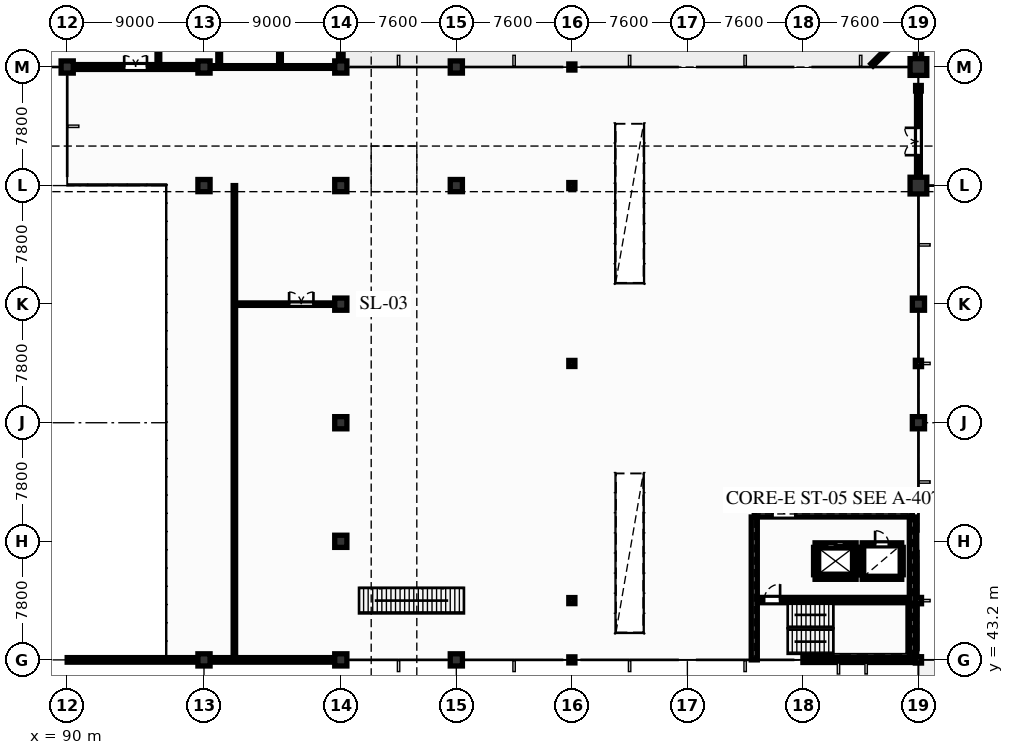
"""IFC4 building model, lengths in metres.
Left out: names, types, materials, properties, quantities, classifications, styles, units other than length and angle.
Written with IfcOpenShell. Run it as: python <this file> out.ifc"""

import sys

from ifc_helpers import new_model, si_unit, direction, frame, frame_2d, origin, origin_2d, place, context, subcontext, project, spatial, polyline, rectangle, i_section, outline, extrude, element, fill, save


model = new_model("IFC4")
c1 = context("Model", 3, precision=1e-05, world=origin(), true_north=direction((0.0, 1.0)))
c2 = subcontext(c1, "Body", "Model", "MODEL_VIEW")
j1 = project(units=[si_unit("LENGTHUNIT", "METRE"), si_unit("PLANEANGLEUNIT", "RADIAN")], contexts=[c1])
p1 = place(None, origin())
s1 = spatial("IfcSite", under=j1, at=p1, CompositionType="ELEMENT")
p2 = place(p1, origin())
s2 = spatial("IfcBuilding", under=s1, at=p2, CompositionType="ELEMENT")
p3 = place(p2, frame((0.0, 0.0, 5.1)))
s3 = spatial("IfcBuildingStorey", under=s2, at=p3, CompositionType="ELEMENT", Elevation=5.1)
for number, where, z_axis, x_axis in (
    (1, (90.0, 82.2, 0.0), (0.0, 0.0, 1.0), (1.0, 0.0, 0.0)),
    (2, (99.0, 43.2, 0.0), (0.0, 0.0, 1.0), (1.0, 0.0, 0.0)),
    (3, (99.0, 74.4, 0.0), (0.0, 0.0, 1.0), (1.0, 0.0, 0.0)),
    (4, (99.0, 82.2, 0.0), (0.0, 0.0, 1.0), (1.0, 0.0, 0.0)),
    (5, (108.0, 43.2, 0.0), (0.0, 0.0, 1.0), (1.0, 0.0, 0.0)),
    (6, (108.0, 51.0, 0.0), (0.0, 0.0, 1.0), (1.0, 0.0, 0.0)),
    (7, (108.0, 58.8, 0.0), (0.0, 0.0, 1.0), (1.0, 0.0, 0.0)),
    (8, (108.0, 66.6, 0.0), (0.0, 0.0, 1.0), (1.0, 0.0, 0.0)),
    (9, (108.0, 74.4, 0.0), (0.0, 0.0, 1.0), (1.0, 0.0, 0.0)),
    (10, (108.0, 82.2, 0.0), (0.0, 0.0, 1.0), (1.0, 0.0, 0.0)),
    (11, (115.6, 43.2, 0.0), (0.0, 0.0, 1.0), (1.0, 0.0, 0.0)),
    (12, (115.6, 74.4, 0.0), (0.0, 0.0, 1.0), (1.0, 0.0, 0.0)),
    (13, (115.6, 82.2, 0.0), (0.0, 0.0, 1.0), (1.0, 0.0, 0.0)),
):
    element("IfcColumn", number, at=place(p3, frame(where, z_axis=z_axis, x_axis=x_axis)), inside=s3, PredefinedType="COLUMN", context=c2, shape_type="SweptSolid", body=[
        extrude(rectangle(XDim=0.8, YDim=0.8, at=origin_2d()), origin(), (0.0, 0.0, 1.0), 3.84),
    ])
for number, where, z_axis, x_axis in (
    (14, (123.2, 43.2, 0.0), (0.0, 0.0, 1.0), (1.0, 0.0, 0.0)),
    (15, (123.2, 74.4, 0.0), (0.0, 0.0, 1.0), (1.0, 0.0, 0.0)),
    (16, (123.2, 82.2, 0.0), (0.0, 0.0, 1.0), (1.0, 0.0, 0.0)),
):
    element("IfcColumn", number, at=place(p3, frame(where, z_axis=z_axis, x_axis=x_axis)), inside=s3, PredefinedType="COLUMN", context=c2, shape_type="SweptSolid", body=[
        extrude(i_section(OverallWidth=0.401, OverallDepth=0.399, WebThickness=0.025, FlangeThickness=0.04, at=origin_2d()), origin(), (0.0, 0.0, 1.0), 3.84),
    ])
for number, where, z_axis, x_axis in (
    (17, (146.0, 58.8, 0.0), (0.0, 0.0, 1.0), (1.0, 0.0, 0.0)),
    (18, (146.0, 66.6, 0.0), (0.0, 0.0, 1.0), (1.0, 0.0, 0.0)),
):
    element("IfcColumn", number, at=place(p3, frame(where, z_axis=z_axis, x_axis=x_axis)), inside=s3, PredefinedType="COLUMN", context=c2, shape_type="SweptSolid", body=[
        extrude(rectangle(XDim=0.8, YDim=0.8, at=origin_2d()), origin(), (0.0, 0.0, 1.0), 3.84),
    ])
for number, where, z_axis, x_axis in (
    (19, (146.0, 74.4, 0.0), (0.0, 0.0, 1.0), (1.0, 0.0, 0.0)),
    (20, (146.0, 82.2, 0.0), (0.0, 0.0, 1.0), (1.0, 0.0, 0.0)),
):
    element("IfcColumn", number, at=place(p3, frame(where, z_axis=z_axis, x_axis=x_axis)), inside=s3, PredefinedType="COLUMN", context=c2, shape_type="SweptSolid", body=[
        extrude(rectangle(XDim=1.1, YDim=1.1, at=origin_2d()), origin(), (0.0, 0.0, 1.0), 3.84),
    ])
p4 = place(p3, frame((123.2, 47.1, 0.0), z_axis=(0.0, 0.0, 1.0), x_axis=(1.0, 0.0, 0.0)))
e21 = element("IfcColumn", 21, at=p4, inside=s3, PredefinedType="COLUMN", context=c2, shape_type="SweptSolid", body=[
    extrude(i_section(OverallWidth=0.401, OverallDepth=0.399, WebThickness=0.025, FlangeThickness=0.04, at=origin_2d()), origin(), (0.0, 0.0, 1.0), 3.84),
])
p5 = place(p3, frame((146.0, 47.1, 0.0), z_axis=(0.0, 0.0, 1.0), x_axis=(1.0, 0.0, 0.0)))
e22 = element("IfcColumn", 22, at=p5, inside=s3, PredefinedType="COLUMN", context=c2, shape_type="SweptSolid", body=[
    extrude(i_section(OverallWidth=0.406, OverallDepth=0.417, WebThickness=0.03, FlangeThickness=0.048, at=origin_2d()), origin(), (0.0, 0.0, 1.0), 3.84),
])
p6 = place(p3, frame((123.2, 62.7, 0.0), z_axis=(0.0, 0.0, 1.0), x_axis=(1.0, 0.0, 0.0)))
e23 = element("IfcColumn", 23, at=p6, inside=s3, PredefinedType="COLUMN", context=c2, shape_type="SweptSolid", body=[
    extrude(i_section(OverallWidth=0.401, OverallDepth=0.399, WebThickness=0.025, FlangeThickness=0.04, at=origin_2d()), origin(), (0.0, 0.0, 1.0), 3.84),
])
for number, where, z_axis, x_axis in (
    (24, (146.0, 62.7, 0.0), (0.0, 0.0, 1.0), (1.0, 0.0, 0.0)),
    (25, (146.0, 43.2, 0.0), (0.0, 0.0, 1.0), (1.0, 0.0, 0.0)),
):
    element("IfcColumn", number, at=place(p3, frame(where, z_axis=z_axis, x_axis=x_axis)), inside=s3, PredefinedType="COLUMN", context=c2, shape_type="SweptSolid", body=[
        extrude(i_section(OverallWidth=0.406, OverallDepth=0.417, WebThickness=0.03, FlangeThickness=0.048, at=origin_2d()), origin(), (0.0, 0.0, 1.0), 3.84),
    ])
p7 = place(p3, frame((146.0, 80.8, 0.0), z_axis=(0.0, 0.0, 1.0), x_axis=(1.0, 0.0, 0.0)))
e26 = element("IfcColumn", 26, at=p7, inside=s3, PredefinedType="COLUMN", context=c2, shape_type="SweptSolid", body=[
    extrude(i_section(OverallWidth=0.373, OverallDepth=0.368, WebThickness=0.015, FlangeThickness=0.024, at=origin_2d()), origin(), (0.0, 0.0, 1.0), 3.84),
])
p8 = place(p3, frame((108.0, 82.2, 0.0), z_axis=(0.0, 0.0, 1.0), x_axis=(0.0, 1.0, 0.0)))
e27 = element("IfcWall", 27, at=p8, inside=s3, PredefinedType="SOLIDWALL", context=c2, shape_type="SweptSolid", body=[
    extrude(rectangle(XDim=31.8, YDim=0.3, at=frame_2d((15.9, 0.0))), origin(), (0.0, 0.0, 1.0), 2.815),
])
p9 = place(p8, frame((3.2, 0.0, 0.595)))
e28 = element("IfcOpeningElement", 28, at=p9, cuts=e27, PredefinedType="OPENING", context=c2, shape_type="SweptSolid", body=[
    extrude(rectangle(XDim=1.5, YDim=2.1, at=frame_2d((0.75, 1.05))), frame((0.0, 0.16, 0.0), z_axis=(0.0, -1.0, 0.0), x_axis=(1.0, 0.0, 0.0)), (0.0, 0.0, 1.0), 0.32),
])
p10 = place(p8, frame((10.5, 0.0, 0.845)))
e29 = element("IfcOpeningElement", 29, at=p10, cuts=e27, PredefinedType="OPENING", context=c2, shape_type="SweptSolid", body=[
    extrude(rectangle(XDim=1.35, YDim=1.85, at=frame_2d((0.675, 0.925))), frame((0.0, 0.16, 0.0), z_axis=(0.0, -1.0, 0.0), x_axis=(1.0, 0.0, 0.0)), (0.0, 0.0, 1.0), 0.32),
])
p11 = place(p3, frame((90.0, 43.2, 0.0), z_axis=(0.0, 0.0, 1.0), x_axis=(1.0, 0.0, 0.0)))
e30 = element("IfcWall", 30, at=p11, inside=s3, PredefinedType="SOLIDWALL", context=c2, shape_type="SweptSolid", body=[
    extrude(outline(polyline([(0.0, 0.0), (18.0, 0.0), (18.0, 9.46), (0.0, 0.11), (0.0, 0.0)])), frame((0.0, 0.15, 0.0), z_axis=(0.0, -1.0, 0.0), x_axis=(1.0, 0.0, 0.0)), (0.0, 0.0, 1.0), 0.3),
])
p12 = place(p3, frame((138.4, 43.2, 0.0), z_axis=(0.0, 0.0, 1.0), x_axis=(1.0, 0.0, 0.0)))
e31 = element("IfcWall", 31, at=p12, inside=s3, PredefinedType="SOLIDWALL", context=c2, shape_type="SweptSolid", body=[
    extrude(rectangle(XDim=7.6, YDim=0.34, at=frame_2d((3.8, 0.0))), origin(), (0.0, 0.0, 1.0), 3.55),
])
p13 = place(p12, frame((2.5, 0.0, 0.9)))
e32 = element("IfcOpeningElement", 32, at=p13, cuts=e31, PredefinedType="OPENING", context=c2, shape_type="SweptSolid", body=[
    extrude(rectangle(XDim=1.5, YDim=2.1, at=frame_2d((0.75, 1.05))), frame((0.0, 0.18, 0.0), z_axis=(0.0, -1.0, 0.0), x_axis=(1.0, 0.0, 0.0)), (0.0, 0.0, 1.0), 0.36),
])
p14 = place(p3, frame((146.0, 82.2, 0.0), z_axis=(0.0, 0.0, 1.0), x_axis=(0.0, 1.0, 0.0)))
e33 = element("IfcWall", 33, at=p14, inside=s3, PredefinedType="SOLIDWALL", context=c2, shape_type="SweptSolid", body=[
    extrude(rectangle(XDim=23.8, YDim=0.42, at=frame_2d((11.9, 0.0))), origin(), (0.0, 0.0, 1.0), 3.84),
])
p15 = place(p14, frame((5.85, 0.0, 0.9)))
e34 = element("IfcOpeningElement", 34, at=p15, cuts=e33, PredefinedType="OPENING", context=c2, shape_type="SweptSolid", body=[
    extrude(rectangle(XDim=1.2, YDim=2.1, at=frame_2d((0.6, 1.05))), frame((0.0, 0.22, 0.0), z_axis=(0.0, -1.0, 0.0), x_axis=(1.0, 0.0, 0.0)), (0.0, 0.0, 1.0), 0.44),
])
p16 = place(p14, frame((14.15, 0.0, 0.9)))
e35 = element("IfcOpeningElement", 35, at=p16, cuts=e33, PredefinedType="OPENING", context=c2, shape_type="SweptSolid", body=[
    extrude(rectangle(XDim=1.2, YDim=2.1, at=frame_2d((0.6, 1.05))), frame((0.0, 0.22, 0.0), z_axis=(0.0, -1.0, 0.0), x_axis=(1.0, 0.0, 0.0)), (0.0, 0.0, 1.0), 0.44),
])
p17 = place(p3, frame((142.941, 82.341, 0.0), z_axis=(0.0, 0.0, 1.0), x_axis=(0.707106781187, 0.707106781187, 0.0)))
e36 = element("IfcWall", 36, at=p17, inside=s3, PredefinedType="PARAPET", context=c2, shape_type="SweptSolid", body=[
    extrude(rectangle(XDim=4.125, YDim=0.2, at=frame_2d((2.063, 0.0))), origin(), (0.0, 0.0, 1.0), 0.72),
])
p18 = place(p3, frame((135.2, 52.8, 0.0), z_axis=(0.0, 0.0, 1.0), x_axis=(1.0, 0.0, 0.0)))
e37 = element("IfcWall", 37, at=p18, inside=s3, PredefinedType="SHEAR", context=c2, shape_type="SweptSolid", body=[
    extrude(rectangle(XDim=10.4, YDim=0.4, at=frame_2d((5.2, 0.0))), origin(), (0.0, 0.0, 1.0), 3.55),
])
p19 = place(p18, frame((1.2, 0.0, 0.0)))
e38 = element("IfcOpeningElement", 38, at=p19, cuts=e37, PredefinedType="OPENING", context=c2, shape_type="SweptSolid", body=[
    extrude(rectangle(XDim=1.5, YDim=2.2, at=frame_2d((0.75, 1.1))), frame((0.0, 0.21, 0.0), z_axis=(0.0, -1.0, 0.0), x_axis=(1.0, 0.0, 0.0)), (0.0, 0.0, 1.0), 0.42),
])
for number, where, z_axis, x_axis in (
    (39, (135.2, 43.2, 0.0), (0.0, 0.0, 1.0), (0.0, 1.0, 0.0)),
    (40, (145.6, 43.2, 0.0), (0.0, 0.0, 1.0), (0.0, 1.0, 0.0)),
):
    element("IfcWall", number, at=place(p3, frame(where, z_axis=z_axis, x_axis=x_axis)), inside=s3, PredefinedType="SHEAR", context=c2, shape_type="SweptSolid", body=[
        extrude(rectangle(XDim=9.4, YDim=0.4, at=frame_2d((4.7, 0.0))), origin(), (0.0, 0.0, 1.0), 3.55),
    ])
p20 = place(p3, frame((135.4, 47.135, 0.0), z_axis=(0.0, 0.0, 1.0), x_axis=(1.0, 0.0, 0.0)))
e41 = element("IfcWall", 41, at=p20, inside=s3, PredefinedType="SHEAR", context=c2, shape_type="SweptSolid", body=[
    extrude(rectangle(XDim=10.0, YDim=0.35, at=frame_2d((5.0, 0.0))), origin(), (0.0, 0.0, 1.0), 3.55),
])
p21 = place(p20, frame((0.45, 0.0, 0.0)))
e42 = element("IfcOpeningElement", 42, at=p21, cuts=e41, PredefinedType="OPENING", context=c2, shape_type="SweptSolid", body=[
    extrude(rectangle(XDim=1.05, YDim=2.2, at=frame_2d((0.525, 1.1))), frame((0.0, 0.185, 0.0), z_axis=(0.0, -1.0, 0.0), x_axis=(1.0, 0.0, 0.0)), (0.0, 0.0, 1.0), 0.37),
])
p22 = place(p3, frame((139.2, 48.6, 0.0), z_axis=(0.0, 0.0, 1.0), x_axis=(1.0, 0.0, 0.0)))
e43 = element("IfcWall", 43, at=p22, inside=s3, PredefinedType="PARTITIONING", context=c2, shape_type="SweptSolid", body=[
    extrude(rectangle(XDim=2.7, YDim=0.2, at=frame_2d((1.35, 0.0))), origin(), (0.0, 0.0, 1.0), 3.55),
])
p23 = place(p3, frame((139.2, 50.8, 0.0), z_axis=(0.0, 0.0, 1.0), x_axis=(1.0, 0.0, 0.0)))
e44 = element("IfcWall", 44, at=p23, inside=s3, PredefinedType="PARTITIONING", context=c2, shape_type="SweptSolid", body=[
    extrude(rectangle(XDim=2.7, YDim=0.2, at=frame_2d((1.35, 0.0))), origin(), (0.0, 0.0, 1.0), 3.55),
])
p24 = place(p23, frame((0.8, 0.0, 0.0)))
e45 = element("IfcOpeningElement", 45, at=p24, cuts=e44, PredefinedType="OPENING", context=c2, shape_type="SweptSolid", body=[
    extrude(rectangle(XDim=1.1, YDim=2.15, at=frame_2d((0.55, 1.075))), frame((0.0, 0.11, 0.0), z_axis=(0.0, -1.0, 0.0), x_axis=(1.0, 0.0, 0.0)), (0.0, 0.0, 1.0), 0.22),
])
for number, where, z_axis, x_axis in (
    (46, (139.2, 48.8, 0.0), (0.0, 0.0, 1.0), (0.0, 1.0, 0.0)),
    (47, (141.9, 48.8, 0.0), (0.0, 0.0, 1.0), (0.0, 1.0, 0.0)),
):
    element("IfcWall", number, at=place(p3, frame(where, z_axis=z_axis, x_axis=x_axis)), inside=s3, PredefinedType="PARTITIONING", context=c2, shape_type="SweptSolid", body=[
        extrude(rectangle(XDim=1.8, YDim=0.2, at=frame_2d((0.9, 0.0))), origin(), (0.0, 0.0, 1.0), 3.55),
    ])
p25 = place(p3, frame((142.3, 48.6, 0.0), z_axis=(0.0, 0.0, 1.0), x_axis=(1.0, 0.0, 0.0)))
e48 = element("IfcWall", 48, at=p25, inside=s3, PredefinedType="PARTITIONING", context=c2, shape_type="SweptSolid", body=[
    extrude(rectangle(XDim=2.6, YDim=0.2, at=frame_2d((1.3, 0.0))), origin(), (0.0, 0.0, 1.0), 3.55),
])
p26 = place(p3, frame((142.3, 50.8, 0.0), z_axis=(0.0, 0.0, 1.0), x_axis=(1.0, 0.0, 0.0)))
e49 = element("IfcWall", 49, at=p26, inside=s3, PredefinedType="PARTITIONING", context=c2, shape_type="SweptSolid", body=[
    extrude(rectangle(XDim=2.6, YDim=0.2, at=frame_2d((1.3, 0.0))), origin(), (0.0, 0.0, 1.0), 3.55),
])
p27 = place(p26, frame((0.85, 0.0, 0.0)))
e50 = element("IfcOpeningElement", 50, at=p27, cuts=e49, PredefinedType="OPENING", context=c2, shape_type="SweptSolid", body=[
    extrude(rectangle(XDim=0.9, YDim=2.1, at=frame_2d((0.45, 1.05))), frame((0.0, 0.11, 0.0), z_axis=(0.0, -1.0, 0.0), x_axis=(1.0, 0.0, 0.0)), (0.0, 0.0, 1.0), 0.22),
])
for number, where, z_axis, x_axis in (
    (51, (142.3, 48.8, 0.0), (0.0, 0.0, 1.0), (0.0, 1.0, 0.0)),
    (52, (144.9, 48.8, 0.0), (0.0, 0.0, 1.0), (0.0, 1.0, 0.0)),
):
    element("IfcWall", number, at=place(p3, frame(where, z_axis=z_axis, x_axis=x_axis)), inside=s3, PredefinedType="PARTITIONING", context=c2, shape_type="SweptSolid", body=[
        extrude(rectangle(XDim=1.8, YDim=0.2, at=frame_2d((0.9, 0.0))), origin(), (0.0, 0.0, 1.0), 3.55),
    ])
p28 = place(p3, frame((90.0, 82.2, 0.0), z_axis=(0.0, 0.0, 1.0), x_axis=(1.0, 0.0, 0.0)))
e53 = element("IfcWall", 53, at=p28, inside=s3, PredefinedType="SHEAR", context=c2, shape_type="SweptSolid", body=[
    extrude(rectangle(XDim=9.0, YDim=0.32, at=frame_2d((4.5, 0.0))), origin(), (0.0, 0.0, 1.0), 3.55),
])
p29 = place(p28, frame((3.75, 0.0, 0.0)))
e54 = element("IfcOpeningElement", 54, at=p29, cuts=e53, PredefinedType="OPENING", context=c2, shape_type="SweptSolid", body=[
    extrude(rectangle(XDim=1.5, YDim=2.2, at=frame_2d((0.75, 1.1))), frame((0.0, 0.17, 0.0), z_axis=(0.0, -1.0, 0.0), x_axis=(1.0, 0.0, 0.0)), (0.0, 0.0, 1.0), 0.34),
])
for number, where, z_axis, x_axis in (
    (55, (96.0, 82.2, 0.0), (0.0, 0.0, 1.0), (0.0, 1.0, 0.0)),
    (56, (100.0, 82.2, 0.0), (0.0, 0.0, 1.0), (0.0, 1.0, 0.0)),
    (57, (104.0, 82.2, 0.0), (0.0, 0.0, 1.0), (0.0, 1.0, 0.0)),
):
    element("IfcWall", number, at=place(p3, frame(where, z_axis=z_axis, x_axis=x_axis)), inside=s3, PredefinedType="PLUMBINGWALL", context=c2, shape_type="SweptSolid", body=[
        extrude(rectangle(XDim=13.4, YDim=0.18, at=frame_2d((6.7, 0.0))), origin(), (0.0, 0.0, 1.0), 3.55),
    ])
p30 = place(p3, frame((101.0, 66.6, 0.0), z_axis=(0.0, 0.0, 1.0), x_axis=(1.0, 0.0, 0.0)))
e58 = element("IfcWall", 58, at=p30, inside=s3, PredefinedType="PARTITIONING", context=c2, shape_type="SweptSolid", body=[
    extrude(rectangle(XDim=7.0, YDim=0.16, at=frame_2d((3.5, 0.0))), origin(), (0.0, 0.0, 1.0), 3.55),
])
p31 = place(p30, frame((3.6, 0.0, 0.0)))
e59 = element("IfcOpeningElement", 59, at=p31, cuts=e58, PredefinedType="OPENING", context=c2, shape_type="SweptSolid", body=[
    extrude(rectangle(XDim=1.6, YDim=2.2, at=frame_2d((0.8, 1.1))), frame((0.0, 0.09, 0.0), z_axis=(0.0, -1.0, 0.0), x_axis=(1.0, 0.0, 0.0)), (0.0, 0.0, 1.0), 0.18),
])
p32 = place(p3, frame((146.0, 74.4, 0.0), z_axis=(0.0, 0.0, 1.0), x_axis=(0.0, 1.0, 0.0)))
e60 = element("IfcWall", 60, at=p32, inside=s3, PredefinedType="PARTITIONING", context=c2, shape_type="SweptSolid", body=[
    extrude(rectangle(XDim=6.0, YDim=0.25, at=frame_2d((3.0, 0.0))), origin(), (0.0, 0.0, 1.0), 3.073),
])
p33 = place(p32, frame((2.0, 0.0, 0.0)))
e61 = element("IfcOpeningElement", 61, at=p33, cuts=e60, PredefinedType="OPENING", context=c2, shape_type="SweptSolid", body=[
    extrude(rectangle(XDim=1.8, YDim=2.3, at=frame_2d((0.9, 1.15))), frame((0.0, 0.135, 0.0), z_axis=(0.0, -1.0, 0.0), x_axis=(1.0, 0.0, 0.0)), (0.0, 0.0, 1.0), 0.27),
])
p34 = place(p3, frame((99.0, 82.2, 0.0), z_axis=(0.0, 0.0, 1.0), x_axis=(1.0, 0.0, 0.0)))
e62 = element("IfcWall", 62, at=p34, inside=s3, PredefinedType="PLUMBINGWALL", context=c2, shape_type="SweptSolid", body=[
    extrude(rectangle(XDim=9.0, YDim=0.18, at=frame_2d((4.5, 0.0))), origin(), (0.0, 0.0, 1.0), 2.873),
])
p35 = place(p3, frame((101.0, 43.2, 0.0), z_axis=(0.0, 0.0, 1.0), x_axis=(0.0, 1.0, 0.0)))
e63 = element("IfcWall", 63, at=p35, inside=s3, PredefinedType="PARTITIONING", context=c2, shape_type="SweptSolid", body=[
    extrude(rectangle(XDim=31.2, YDim=0.16, at=frame_2d((15.6, 0.0))), origin(), (0.0, 0.0, 1.0), 3.55),
])
p36 = place(p13, origin())
e64 = element("IfcWindow", 64, at=p36, inside=s3, PartitioningType="SINGLE_PANEL", PredefinedType="WINDOW", context=c2, shape_type="SweptSolid", body=[
    extrude(rectangle(XDim=1.5, YDim=2.1, at=frame_2d((0.75, 1.05))), frame((0.0, 0.03, 0.0), z_axis=(0.0, -1.0, 0.0), x_axis=(1.0, 0.0, 0.0)), (0.0, 0.0, 1.0), 0.06),
])
fill(e32, e64)
p37 = place(p19, origin())
e65 = element("IfcDoor", 65, at=p37, inside=s3, OperationType="DOUBLE_DOOR_SINGLE_SWING", PredefinedType="DOOR", context=c2, shape_type="SweptSolid", body=[
    extrude(rectangle(XDim=1.5, YDim=2.2, at=frame_2d((0.75, 1.1))), frame((0.0, 0.025, 0.0), z_axis=(0.0, -1.0, 0.0), x_axis=(1.0, 0.0, 0.0)), (0.0, 0.0, 1.0), 0.05),
])
fill(e38, e65)
p38 = place(p21, origin())
e66 = element("IfcDoor", 66, at=p38, inside=s3, OperationType="SINGLE_SWING_RIGHT", PredefinedType="DOOR", context=c2, shape_type="SweptSolid", body=[
    extrude(rectangle(XDim=1.05, YDim=2.2, at=frame_2d((0.525, 1.1))), frame((0.0, 0.025, 0.0), z_axis=(0.0, -1.0, 0.0), x_axis=(1.0, 0.0, 0.0)), (0.0, 0.0, 1.0), 0.05),
])
fill(e42, e66)
p39 = place(p24, origin())
e67 = element("IfcDoor", 67, at=p39, inside=s3, OperationType="SLIDING_TO_LEFT", PredefinedType="DOOR", context=c2, shape_type="SweptSolid", body=[
    extrude(rectangle(XDim=1.1, YDim=2.15, at=frame_2d((0.55, 1.075))), frame((0.0, 0.025, 0.0), z_axis=(0.0, -1.0, 0.0), x_axis=(1.0, 0.0, 0.0)), (0.0, 0.0, 1.0), 0.05),
])
fill(e45, e67)
p40 = place(p27, origin())
e68 = element("IfcDoor", 68, at=p40, inside=s3, OperationType="SINGLE_SWING_LEFT", PredefinedType="DOOR", context=c2, shape_type="SweptSolid", body=[
    extrude(rectangle(XDim=0.9, YDim=2.1, at=frame_2d((0.45, 1.05))), frame((0.0, 0.025, 0.0), z_axis=(0.0, -1.0, 0.0), x_axis=(1.0, 0.0, 0.0)), (0.0, 0.0, 1.0), 0.05),
])
fill(e50, e68)
p41 = place(p29, origin())
e69 = element("IfcDoor", 69, at=p41, inside=s3, OperationType="DOUBLE_DOOR_SINGLE_SWING", PredefinedType="DOOR", context=c2, shape_type="SweptSolid", body=[
    extrude(rectangle(XDim=1.5, YDim=2.2, at=frame_2d((0.75, 1.1))), frame((0.0, 0.025, 0.0), z_axis=(0.0, -1.0, 0.0), x_axis=(1.0, 0.0, 0.0)), (0.0, 0.0, 1.0), 0.05),
])
fill(e54, e69)
p42 = place(p31, origin())
e70 = element("IfcDoor", 70, at=p42, inside=s3, OperationType="DOUBLE_DOOR_SINGLE_SWING", PredefinedType="DOOR", context=c2, shape_type="SweptSolid", body=[
    extrude(rectangle(XDim=1.6, YDim=2.2, at=frame_2d((0.8, 1.1))), frame((0.0, 0.025, 0.0), z_axis=(0.0, -1.0, 0.0), x_axis=(1.0, 0.0, 0.0)), (0.0, 0.0, 1.0), 0.05),
])
fill(e59, e70)
p43 = place(p33, origin())
e71 = element("IfcDoor", 71, at=p43, inside=s3, OperationType="DOUBLE_DOOR_SINGLE_SWING", PredefinedType="DOOR", context=c2, shape_type="SweptSolid", body=[
    extrude(rectangle(XDim=1.8, YDim=2.3, at=frame_2d((0.9, 1.15))), frame((0.0, 0.025, 0.0), z_axis=(0.0, -1.0, 0.0), x_axis=(1.0, 0.0, 0.0)), (0.0, 0.0, 1.0), 0.05),
])
fill(e61, e71)
save(model, sys.argv[1])
